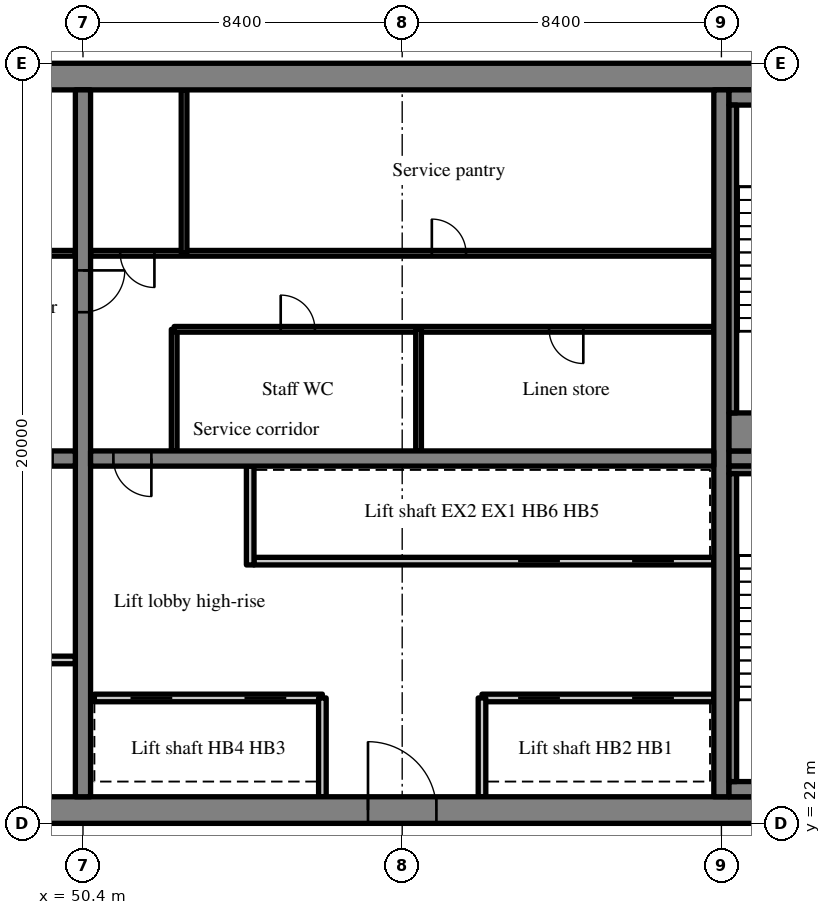
"""IFC4 building model, lengths in metres.
Left out: names, types, materials, properties, quantities, classifications, styles, units other than length and angle.
Written with IfcOpenShell. Run it as: python <this file> out.ifc"""

import sys

from ifc_helpers import new_model, si_unit, direction, frame, frame_2d, origin, place, context, subcontext, project, spatial, rectangle, extrude, source, transform, mapped, element, fill, save


model = new_model("IFC4")
c1 = context("Model", 3, precision=1e-05, world=origin(), true_north=direction((0.0, 1.0)))
c2 = subcontext(c1, "Body", "Model", "MODEL_VIEW")
j1 = project(units=[si_unit("LENGTHUNIT", "METRE"), si_unit("PLANEANGLEUNIT", "RADIAN")], contexts=[c1])
p1 = place(None, origin())
s1 = spatial("IfcSite", under=j1, at=p1, CompositionType="ELEMENT")
p2 = place(p1, origin())
s2 = spatial("IfcBuilding", under=s1, at=p2, CompositionType="ELEMENT")
p3 = place(p2, frame((0.0, 0.0, 197.2)))
s3 = spatial("IfcBuildingStorey", under=s2, at=p3, CompositionType="ELEMENT", Elevation=197.2)
m1 = source(origin(), c2, "Body", "SweptSolid", [
    extrude(rectangle(XDim=50.4, YDim=0.7, at=frame_2d((25.2, 0.0))), origin(), (0.0, 0.0, 1.0), 3.52),
])
p4 = place(p3, frame((25.2, 22.35, 0.0), z_axis=(0.0, 0.0, 1.0), x_axis=(1.0, 0.0, 0.0)))
e1 = element("IfcWall", 1, at=p4, inside=s3, PredefinedType="SHEAR", context=c2, shape_type="MappedRepresentation", body=[
    mapped(m1, transform((0.0, 0.0, 0.0), scale=1.0)),
])
m2 = source(origin(), c2, "Body", "SweptSolid", [
    extrude(rectangle(XDim=1.8, YDim=2.1, at=frame_2d((0.9, 1.05))), frame((0.0, 0.36, 0.0), z_axis=(0.0, -1.0, 0.0), x_axis=(1.0, 0.0, 0.0)), (0.0, 0.0, 1.0), 0.72),
])
p5 = place(p4, frame((15.9, 0.0, 0.0)))
e2 = element("IfcOpeningElement", 2, at=p5, cuts=e1, PredefinedType="OPENING", context=c2, shape_type="MappedRepresentation", body=[
    mapped(m2, transform((0.0, 0.0, 0.0), scale=1.0)),
])
m3 = source(origin(), c2, "Body", "SweptSolid", [
    extrude(rectangle(XDim=0.9, YDim=2.1, at=frame_2d((0.45, 1.05))), frame((0.0, 0.36, 0.0), z_axis=(0.0, -1.0, 0.0), x_axis=(1.0, 0.0, 0.0)), (0.0, 0.0, 1.0), 0.72),
])
p6 = place(p4, frame((21.5, 0.0, 0.0)))
e3 = element("IfcOpeningElement", 3, at=p6, cuts=e1, PredefinedType="OPENING", context=c2, shape_type="MappedRepresentation", body=[
    mapped(m3, transform((0.0, 0.0, 0.0), scale=1.0)),
])
p7 = place(p4, frame((32.7, 0.0, 0.0)))
e4 = element("IfcOpeningElement", 4, at=p7, cuts=e1, PredefinedType="OPENING", context=c2, shape_type="MappedRepresentation", body=[
    mapped(m2, transform((0.0, 0.0, 0.0), scale=1.0)),
])
m4 = source(origin(), c2, "Body", "SweptSolid", [
    extrude(rectangle(XDim=1.2, YDim=2.1, at=frame_2d((0.6, 1.05))), frame((0.0, 0.36, 0.0), z_axis=(0.0, -1.0, 0.0), x_axis=(1.0, 0.0, 0.0)), (0.0, 0.0, 1.0), 0.72),
])
p8 = place(p4, frame((6.475, 0.0, 0.0)))
e5 = element("IfcOpeningElement", 5, at=p8, cuts=e1, PredefinedType="OPENING", context=c2, shape_type="MappedRepresentation", body=[
    mapped(m4, transform((0.0, 0.0, 0.0), scale=1.0)),
])
p9 = place(p4, frame((47.875, 0.0, 0.0)))
e6 = element("IfcOpeningElement", 6, at=p9, cuts=e1, PredefinedType="OPENING", context=c2, shape_type="MappedRepresentation", body=[
    mapped(m4, transform((0.0, 0.0, 0.0), scale=1.0)),
])
p10 = place(p3, frame((25.2, 41.65, 0.0), z_axis=(0.0, 0.0, 1.0), x_axis=(1.0, 0.0, 0.0)))
e7 = element("IfcWall", 7, at=p10, inside=s3, PredefinedType="SHEAR", context=c2, shape_type="MappedRepresentation", body=[
    mapped(m1, transform((0.0, 0.0, 0.0), scale=1.0)),
])
m5 = source(origin(), c2, "Body", "SweptSolid", [
    extrude(rectangle(XDim=18.6, YDim=0.4, at=frame_2d((9.3, 0.0))), origin(), (0.0, 0.0, 1.0), 3.52),
])
p11 = place(p3, frame((50.4, 22.7, 0.0), z_axis=(0.0, 0.0, 1.0), x_axis=(0.0, 1.0, 0.0)))
e8 = element("IfcWall", 8, at=p11, inside=s3, PredefinedType="SHEAR", context=c2, shape_type="MappedRepresentation", body=[
    mapped(m5, transform((0.0, 0.0, 0.0), scale=1.0)),
])
m6 = source(origin(), c2, "Body", "SweptSolid", [
    extrude(rectangle(XDim=1.1, YDim=2.1, at=frame_2d((0.55, 1.05))), frame((0.0, 0.21, 0.0), z_axis=(0.0, -1.0, 0.0), x_axis=(1.0, 0.0, 0.0)), (0.0, 0.0, 1.0), 0.42),
])
p12 = place(p11, frame((12.75, 0.0, 0.0)))
e9 = element("IfcOpeningElement", 9, at=p12, cuts=e8, PredefinedType="OPENING", context=c2, shape_type="MappedRepresentation", body=[
    mapped(m6, transform((0.0, 0.0, 0.0), scale=1.0)),
])
p13 = place(p3, frame((67.2, 22.7, 0.0), z_axis=(0.0, 0.0, 1.0), x_axis=(0.0, 1.0, 0.0)))
e10 = element("IfcWall", 10, at=p13, inside=s3, PredefinedType="SHEAR", context=c2, shape_type="MappedRepresentation", body=[
    mapped(m5, transform((0.0, 0.0, 0.0), scale=1.0)),
])
m7 = source(origin(), c2, "Body", "SweptSolid", [
    extrude(rectangle(XDim=16.4, YDim=0.4, at=frame_2d((8.2, 0.0))), origin(), (0.0, 0.0, 1.0), 3.52),
])
p14 = place(p3, frame((33.8, 31.6, 0.0), z_axis=(0.0, 0.0, 1.0), x_axis=(1.0, 0.0, 0.0)))
e11 = element("IfcWall", 11, at=p14, inside=s3, PredefinedType="SHEAR", context=c2, shape_type="MappedRepresentation", body=[
    mapped(m7, transform((0.0, 0.0, 0.0), scale=1.0)),
])
m8 = source(origin(), c2, "Body", "SweptSolid", [
    extrude(rectangle(XDim=1.0, YDim=2.1, at=frame_2d((0.5, 1.05))), frame((0.0, 0.21, 0.0), z_axis=(0.0, -1.0, 0.0), x_axis=(1.0, 0.0, 0.0)), (0.0, 0.0, 1.0), 0.42),
])
p15 = place(p14, frame((14.8, 0.0, 0.0)))
e12 = element("IfcOpeningElement", 12, at=p15, cuts=e11, PredefinedType="OPENING", context=c2, shape_type="MappedRepresentation", body=[
    mapped(m8, transform((0.0, 0.0, 0.0), scale=1.0)),
])
p16 = place(p3, frame((50.6, 31.6, 0.0), z_axis=(0.0, 0.0, 1.0), x_axis=(1.0, 0.0, 0.0)))
e13 = element("IfcWall", 13, at=p16, inside=s3, PredefinedType="SHEAR", context=c2, shape_type="MappedRepresentation", body=[
    mapped(m7, transform((0.0, 0.0, 0.0), scale=1.0)),
])
p17 = place(p16, frame((0.6, 0.0, 0.0)))
e14 = element("IfcOpeningElement", 14, at=p17, cuts=e13, PredefinedType="OPENING", context=c2, shape_type="MappedRepresentation", body=[
    mapped(m8, transform((0.0, 0.0, 0.0), scale=1.0)),
])
m9 = source(origin(), c2, "Body", "SweptSolid", [
    extrude(rectangle(XDim=7.5, YDim=0.4, at=frame_2d((3.75, 0.0))), origin(), (0.0, 0.0, 1.0), 3.52),
])
p18 = place(p3, frame((67.4, 31.6, 0.0), z_axis=(0.0, 0.0, 1.0), x_axis=(1.0, 0.0, 0.0)))
e15 = element("IfcWall", 15, at=p18, inside=s3, PredefinedType="SHEAR", context=c2, shape_type="MappedRepresentation", body=[
    mapped(m9, transform((0.0, 0.0, 0.0), scale=1.0)),
])
p19 = place(p18, frame((5.725, 0.0, 0.0)))
e16 = element("IfcOpeningElement", 16, at=p19, cuts=e15, PredefinedType="OPENING", context=c2, shape_type="MappedRepresentation", body=[
    mapped(m6, transform((0.0, 0.0, 0.0), scale=1.0)),
])
m10 = source(origin(), c2, "Body", "SweptSolid", [
    extrude(rectangle(XDim=6.1, YDim=0.2, at=frame_2d((3.05, 0.0))), origin(), (0.0, 0.0, 1.0), 3.52),
])
p20 = place(p3, frame((44.1, 26.3, 0.0), z_axis=(0.0, 0.0, 1.0), x_axis=(1.0, 0.0, 0.0)))
e17 = element("IfcWall", 17, at=p20, inside=s3, PredefinedType="PARTITIONING", context=c2, shape_type="MappedRepresentation", body=[
    mapped(m10, transform((0.0, 0.0, 0.0), scale=1.0)),
])
m11 = source(origin(), c2, "Body", "SweptSolid", [
    extrude(rectangle(XDim=16.4, YDim=0.15, at=frame_2d((8.2, 0.0))), origin(), (0.0, 0.0, 1.0), 3.52),
])
p21 = place(p3, frame((33.8, 37.0, 0.0), z_axis=(0.0, 0.0, 1.0), x_axis=(1.0, 0.0, 0.0)))
e18 = element("IfcWall", 18, at=p21, inside=s3, PredefinedType="PARTITIONING", context=c2, shape_type="MappedRepresentation", body=[
    mapped(m11, transform((0.0, 0.0, 0.0), scale=1.0)),
])
m12 = source(origin(), c2, "Body", "SweptSolid", [
    extrude(rectangle(XDim=0.9, YDim=2.1, at=frame_2d((0.45, 1.05))), frame((0.0, 0.085, 0.0), z_axis=(0.0, -1.0, 0.0), x_axis=(1.0, 0.0, 0.0)), (0.0, 0.0, 1.0), 0.17),
])
p22 = place(p21, frame((0.78, 0.0, 0.0)))
e19 = element("IfcOpeningElement", 19, at=p22, cuts=e18, PredefinedType="OPENING", context=c2, shape_type="MappedRepresentation", body=[
    mapped(m12, transform((0.0, 0.0, 0.0), scale=1.0)),
])
p23 = place(p21, frame((3.65, 0.0, 0.0)))
e20 = element("IfcOpeningElement", 20, at=p23, cuts=e18, PredefinedType="OPENING", context=c2, shape_type="MappedRepresentation", body=[
    mapped(m12, transform((0.0, 0.0, 0.0), scale=1.0)),
])
p24 = place(p21, frame((9.39, 0.0, 0.0)))
e21 = element("IfcOpeningElement", 21, at=p24, cuts=e18, PredefinedType="OPENING", context=c2, shape_type="MappedRepresentation", body=[
    mapped(m12, transform((0.0, 0.0, 0.0), scale=1.0)),
])
p25 = place(p21, frame((14.72, 0.0, 0.0)))
e22 = element("IfcOpeningElement", 22, at=p25, cuts=e18, PredefinedType="OPENING", context=c2, shape_type="MappedRepresentation", body=[
    mapped(m12, transform((0.0, 0.0, 0.0), scale=1.0)),
])
m13 = source(origin(), c2, "Body", "SweptSolid", [
    extrude(rectangle(XDim=6.1, YDim=0.2, at=frame_2d((3.05, 0.0))), origin(), (0.0, 0.0, 1.0), 3.52),
])
p26 = place(p3, frame((67.0, 25.3, 0.0), z_axis=(0.0, 0.0, 1.0), x_axis=(-1.0, 0.0, 0.0)))
e23 = element("IfcWall", 23, at=p26, inside=s3, PredefinedType="SOLIDWALL", context=c2, shape_type="MappedRepresentation", body=[
    mapped(m13, transform((0.0, 0.0, 0.0), scale=1.0)),
])
m14 = source(origin(), c2, "Body", "SweptSolid", [
    extrude(rectangle(XDim=1.1, YDim=2.1, at=frame_2d((0.55, 1.05))), frame((0.0, 0.11, 0.0), z_axis=(0.0, -1.0, 0.0), x_axis=(1.0, 0.0, 0.0)), (0.0, 0.0, 1.0), 0.22),
])
p27 = place(p26, frame((1.05, 0.0, 0.0)))
e24 = element("IfcOpeningElement", 24, at=p27, cuts=e23, PredefinedType="OPENING", context=c2, shape_type="MappedRepresentation", body=[
    mapped(m14, transform((0.0, 0.0, 0.0), scale=1.0)),
])
p28 = place(p26, frame((4.05, 0.0, 0.0)))
e25 = element("IfcOpeningElement", 25, at=p28, cuts=e23, PredefinedType="OPENING", context=c2, shape_type="MappedRepresentation", body=[
    mapped(m14, transform((0.0, 0.0, 0.0), scale=1.0)),
])
m15 = source(origin(), c2, "Body", "SweptSolid", [
    extrude(rectangle(XDim=6.0, YDim=0.2, at=frame_2d((3.0, 0.0))), origin(), (0.0, 0.0, 1.0), 3.52),
])
p29 = place(p3, frame((56.7, 25.3, 0.0), z_axis=(0.0, 0.0, 1.0), x_axis=(-1.0, 0.0, 0.0)))
e26 = element("IfcWall", 26, at=p29, inside=s3, PredefinedType="SOLIDWALL", context=c2, shape_type="MappedRepresentation", body=[
    mapped(m15, transform((0.0, 0.0, 0.0), scale=1.0)),
])
p30 = place(p29, frame((0.95, 0.0, 0.0)))
e27 = element("IfcOpeningElement", 27, at=p30, cuts=e26, PredefinedType="OPENING", context=c2, shape_type="MappedRepresentation", body=[
    mapped(m14, transform((0.0, 0.0, 0.0), scale=1.0)),
])
p31 = place(p29, frame((3.95, 0.0, 0.0)))
e28 = element("IfcOpeningElement", 28, at=p31, cuts=e26, PredefinedType="OPENING", context=c2, shape_type="MappedRepresentation", body=[
    mapped(m14, transform((0.0, 0.0, 0.0), scale=1.0)),
])
m16 = source(origin(), c2, "Body", "SweptSolid", [
    extrude(rectangle(XDim=12.1, YDim=0.2, at=frame_2d((6.05, 0.0))), origin(), (0.0, 0.0, 1.0), 3.52),
])
p32 = place(p3, frame((67.0, 28.9, 0.0), z_axis=(0.0, 0.0, 1.0), x_axis=(-1.0, 0.0, 0.0)))
e29 = element("IfcWall", 29, at=p32, inside=s3, PredefinedType="SOLIDWALL", context=c2, shape_type="MappedRepresentation", body=[
    mapped(m16, transform((0.0, 0.0, 0.0), scale=1.0)),
])
p33 = place(p32, frame((1.05, 0.0, 0.0)))
e30 = element("IfcOpeningElement", 30, at=p33, cuts=e29, PredefinedType="OPENING", context=c2, shape_type="MappedRepresentation", body=[
    mapped(m14, transform((0.0, 0.0, 0.0), scale=1.0)),
])
p34 = place(p32, frame((4.05, 0.0, 0.0)))
e31 = element("IfcOpeningElement", 31, at=p34, cuts=e29, PredefinedType="OPENING", context=c2, shape_type="MappedRepresentation", body=[
    mapped(m14, transform((0.0, 0.0, 0.0), scale=1.0)),
])
m17 = source(origin(), c2, "Body", "SweptSolid", [
    extrude(rectangle(XDim=2.6, YDim=0.2, at=frame_2d((1.3, 0.0))), origin(), (0.0, 0.0, 1.0), 3.52),
])
for number, where, z_axis, x_axis in (
    (32, (60.9, 22.7, 0.0), (0.0, 0.0, 1.0), (0.0, 1.0, 0.0)),
    (33, (56.7, 22.7, 0.0), (0.0, 0.0, 1.0), (0.0, 1.0, 0.0)),
):
    element("IfcWall", number, at=place(p3, frame(where, z_axis=z_axis, x_axis=x_axis)), inside=s3, PredefinedType="SOLIDWALL", context=c2, shape_type="MappedRepresentation", body=[
        mapped(m17, transform((0.0, 0.0, 0.0), scale=1.0)),
    ])
m18 = source(origin(), c2, "Body", "SweptSolid", [
    extrude(rectangle(XDim=2.6, YDim=0.2, at=frame_2d((1.3, 0.0))), origin(), (0.0, 0.0, 1.0), 3.52),
])
p35 = place(p3, frame((54.8, 28.8, 0.0), z_axis=(0.0, 0.0, 1.0), x_axis=(0.0, 1.0, 0.0)))
e34 = element("IfcWall", 34, at=p35, inside=s3, PredefinedType="SOLIDWALL", context=c2, shape_type="MappedRepresentation", body=[
    mapped(m18, transform((0.0, 0.0, 0.0), scale=1.0)),
])
m19 = source(origin(), c2, "Body", "SweptSolid", [
    extrude(rectangle(XDim=3.2, YDim=0.15, at=frame_2d((1.6, 0.0))), origin(), (0.0, 0.0, 1.0), 3.52),
])
p36 = place(p3, frame((52.8, 31.8, 0.0), z_axis=(0.0, 0.0, 1.0), x_axis=(0.0, 1.0, 0.0)))
e35 = element("IfcWall", 35, at=p36, inside=s3, PredefinedType="PARTITIONING", context=c2, shape_type="MappedRepresentation", body=[
    mapped(m19, transform((0.0, 0.0, 0.0), scale=1.0)),
])
m20 = source(origin(), c2, "Body", "SweptSolid", [
    extrude(rectangle(XDim=14.2, YDim=0.15, at=frame_2d((7.1, 0.0))), origin(), (0.0, 0.0, 1.0), 3.52),
])
p37 = place(p3, frame((67.0, 35.0, 0.0), z_axis=(0.0, 0.0, 1.0), x_axis=(-1.0, 0.0, 0.0)))
e36 = element("IfcWall", 36, at=p37, inside=s3, PredefinedType="PARTITIONING", context=c2, shape_type="MappedRepresentation", body=[
    mapped(m20, transform((0.0, 0.0, 0.0), scale=1.0)),
])
p38 = place(p37, frame((3.434, 0.0, 0.0)))
e37 = element("IfcOpeningElement", 37, at=p38, cuts=e36, PredefinedType="OPENING", context=c2, shape_type="MappedRepresentation", body=[
    mapped(m12, transform((0.0, 0.0, 0.0), scale=1.0)),
])
p39 = place(p37, frame((10.497, 0.0, 0.0)))
e38 = element("IfcOpeningElement", 38, at=p39, cuts=e36, PredefinedType="OPENING", context=c2, shape_type="MappedRepresentation", body=[
    mapped(m12, transform((0.0, 0.0, 0.0), scale=1.0)),
])
p40 = place(p3, frame((67.0, 37.0, 0.0), z_axis=(0.0, 0.0, 1.0), x_axis=(-1.0, 0.0, 0.0)))
e39 = element("IfcWall", 39, at=p40, inside=s3, PredefinedType="PARTITIONING", context=c2, shape_type="MappedRepresentation", body=[
    mapped(m11, transform((0.0, 0.0, 0.0), scale=1.0)),
])
p41 = place(p40, frame((6.52, 0.0, 0.0)))
e40 = element("IfcOpeningElement", 40, at=p41, cuts=e39, PredefinedType="OPENING", context=c2, shape_type="MappedRepresentation", body=[
    mapped(m12, transform((0.0, 0.0, 0.0), scale=1.0)),
])
p42 = place(p40, frame((14.72, 0.0, 0.0)))
e41 = element("IfcOpeningElement", 41, at=p42, cuts=e39, PredefinedType="OPENING", context=c2, shape_type="MappedRepresentation", body=[
    mapped(m12, transform((0.0, 0.0, 0.0), scale=1.0)),
])
p43 = place(p3, frame((59.231, 31.8, 0.0), z_axis=(0.0, 0.0, 1.0), x_axis=(0.0, 1.0, 0.0)))
e42 = element("IfcWall", 42, at=p43, inside=s3, PredefinedType="PARTITIONING", context=c2, shape_type="MappedRepresentation", body=[
    mapped(m19, transform((0.0, 0.0, 0.0), scale=1.0)),
])
m21 = source(origin(), c2, "Body", "SweptSolid", [
    extrude(rectangle(XDim=4.3, YDim=0.15, at=frame_2d((2.15, 0.0))), origin(), (0.0, 0.0, 1.0), 3.52),
])
p44 = place(p3, frame((53.06, 37.0, 0.0), z_axis=(0.0, 0.0, 1.0), x_axis=(0.0, 1.0, 0.0)))
e43 = element("IfcWall", 43, at=p44, inside=s3, PredefinedType="PARTITIONING", context=c2, shape_type="MappedRepresentation", body=[
    mapped(m21, transform((0.0, 0.0, 0.0), scale=1.0)),
])
m22 = source(origin(), c2, "Body", "SweptSolid", [
    extrude(rectangle(XDim=4.85, YDim=0.4, at=frame_2d((2.425, 0.0))), origin(), (0.0, 0.0, 1.0), 3.52),
])
p45 = place(p3, frame((67.4, 22.9, 0.0), z_axis=(0.0, 0.0, 1.0), x_axis=(1.0, 0.0, 0.0)))
e44 = element("IfcWall", 44, at=p45, inside=s3, PredefinedType="SOLIDWALL", context=c2, shape_type="MappedRepresentation", body=[
    mapped(m22, transform((0.0, 0.0, 0.0), scale=1.0)),
])
m23 = source(origin(), c2, "Body", "SweptSolid", [
    extrude(rectangle(XDim=4.85, YDim=0.2, at=frame_2d((2.425, 0.0))), origin(), (0.0, 0.0, 1.0), 3.52),
])
p46 = place(p3, frame((67.4, 31.3, 0.0), z_axis=(0.0, 0.0, 1.0), x_axis=(1.0, 0.0, 0.0)))
e45 = element("IfcWall", 45, at=p46, inside=s3, PredefinedType="SOLIDWALL", context=c2, shape_type="MappedRepresentation", body=[
    mapped(m23, transform((0.0, 0.0, 0.0), scale=1.0)),
])
m24 = source(origin(), c2, "Body", "SweptSolid", [
    extrude(rectangle(XDim=8.1, YDim=0.2, at=frame_2d((4.05, 0.0))), origin(), (0.0, 0.0, 1.0), 3.52),
])
p47 = place(p3, frame((67.5, 23.1, 0.0), z_axis=(0.0, 0.0, 1.0), x_axis=(0.0, 1.0, 0.0)))
e46 = element("IfcWall", 46, at=p47, inside=s3, PredefinedType="SOLIDWALL", context=c2, shape_type="MappedRepresentation", body=[
    mapped(m24, transform((0.0, 0.0, 0.0), scale=1.0)),
])
p48 = place(p3, frame((67.4, 41.1, 0.0), z_axis=(0.0, 0.0, 1.0), x_axis=(1.0, 0.0, 0.0)))
e47 = element("IfcWall", 47, at=p48, inside=s3, PredefinedType="SOLIDWALL", context=c2, shape_type="MappedRepresentation", body=[
    mapped(m22, transform((0.0, 0.0, 0.0), scale=1.0)),
])
m25 = source(origin(), c2, "Body", "SweptSolid", [
    extrude(rectangle(XDim=4.85, YDim=1.0, at=frame_2d((2.425, 0.0))), origin(), (0.0, 0.0, 1.0), 3.52),
])
p49 = place(p3, frame((67.4, 32.3, 0.0), z_axis=(0.0, 0.0, 1.0), x_axis=(1.0, 0.0, 0.0)))
e48 = element("IfcWall", 48, at=p49, inside=s3, PredefinedType="SOLIDWALL", context=c2, shape_type="MappedRepresentation", body=[
    mapped(m25, transform((0.0, 0.0, 0.0), scale=1.0)),
])
p50 = place(p3, frame((67.5, 32.8, 0.0), z_axis=(0.0, 0.0, 1.0), x_axis=(0.0, 1.0, 0.0)))
e49 = element("IfcWall", 49, at=p50, inside=s3, PredefinedType="SOLIDWALL", context=c2, shape_type="MappedRepresentation", body=[
    mapped(m24, transform((0.0, 0.0, 0.0), scale=1.0)),
])
m26 = source(origin(), c2, "Body", "SweptSolid", [
    extrude(rectangle(XDim=1.8, YDim=2.1, at=frame_2d((0.9, 1.05))), frame((0.0, 0.275, 0.0), z_axis=(0.0, -1.0, 0.0), x_axis=(1.0, 0.0, 0.0)), (0.0, 0.0, 1.0), 0.05),
])
p51 = place(p7, origin())
e50 = element("IfcDoor", 50, at=p51, inside=s3, OperationType="DOUBLE_DOOR_SINGLE_SWING", PredefinedType="DOOR", context=c2, shape_type="MappedRepresentation", body=[
    mapped(m26, transform((0.0, 0.0, 0.0), scale=1.0)),
])
fill(e4, e50)
m27 = source(origin(), c2, "Body", "SweptSolid", [
    extrude(rectangle(XDim=1.0, YDim=2.1, at=frame_2d((0.5, 1.05))), frame((0.0, 0.025, 0.0), z_axis=(0.0, -1.0, 0.0), x_axis=(1.0, 0.0, 0.0)), (0.0, 0.0, 1.0), 0.05),
])
p52 = place(p17, origin())
e51 = element("IfcDoor", 51, at=p52, inside=s3, OperationType="SINGLE_SWING_RIGHT", PredefinedType="DOOR", context=c2, shape_type="MappedRepresentation", body=[
    mapped(m27, transform((0.0, 0.0, 0.0), scale=1.0)),
])
fill(e14, e51)
m28 = source(origin(), c2, "Body", "SweptSolid", [
    extrude(rectangle(XDim=1.1, YDim=2.1, at=frame_2d((0.55, 1.05))), frame((0.0, 0.025, 0.0), z_axis=(0.0, -1.0, 0.0), x_axis=(1.0, 0.0, 0.0)), (0.0, 0.0, 1.0), 0.05),
])
p53 = place(p27, origin())
e52 = element("IfcDoor", 52, at=p53, inside=s3, OperationType="SLIDING_TO_RIGHT", PredefinedType="DOOR", context=c2, shape_type="MappedRepresentation", body=[
    mapped(m28, transform((0.0, 0.0, 0.0), scale=1.0)),
])
fill(e24, e52)
p54 = place(p28, origin())
e53 = element("IfcDoor", 53, at=p54, inside=s3, OperationType="SLIDING_TO_LEFT", PredefinedType="DOOR", context=c2, shape_type="MappedRepresentation", body=[
    mapped(m28, transform((0.0, 0.0, 0.0), scale=1.0)),
])
fill(e25, e53)
p55 = place(p30, origin())
e54 = element("IfcDoor", 54, at=p55, inside=s3, OperationType="SLIDING_TO_RIGHT", PredefinedType="DOOR", context=c2, shape_type="MappedRepresentation", body=[
    mapped(m28, transform((0.0, 0.0, 0.0), scale=1.0)),
])
fill(e27, e54)
p56 = place(p31, origin())
e55 = element("IfcDoor", 55, at=p56, inside=s3, OperationType="SLIDING_TO_LEFT", PredefinedType="DOOR", context=c2, shape_type="MappedRepresentation", body=[
    mapped(m28, transform((0.0, 0.0, 0.0), scale=1.0)),
])
fill(e28, e55)
p57 = place(p33, origin())
e56 = element("IfcDoor", 56, at=p57, inside=s3, OperationType="SLIDING_TO_RIGHT", PredefinedType="DOOR", context=c2, shape_type="MappedRepresentation", body=[
    mapped(m28, transform((0.0, 0.0, 0.0), scale=1.0)),
])
fill(e30, e56)
p58 = place(p34, origin())
e57 = element("IfcDoor", 57, at=p58, inside=s3, OperationType="SLIDING_TO_LEFT", PredefinedType="DOOR", context=c2, shape_type="MappedRepresentation", body=[
    mapped(m28, transform((0.0, 0.0, 0.0), scale=1.0)),
])
fill(e31, e57)
m29 = source(origin(), c2, "Body", "SweptSolid", [
    extrude(rectangle(XDim=0.9, YDim=2.1, at=frame_2d((0.45, 1.05))), frame((0.0, 0.025, 0.0), z_axis=(0.0, -1.0, 0.0), x_axis=(1.0, 0.0, 0.0)), (0.0, 0.0, 1.0), 0.05),
])
p59 = place(p38, origin())
e58 = element("IfcDoor", 58, at=p59, inside=s3, OperationType="SINGLE_SWING_LEFT", PredefinedType="DOOR", context=c2, shape_type="MappedRepresentation", body=[
    mapped(m29, transform((0.0, 0.0, 0.0), scale=1.0)),
])
fill(e37, e58)
p60 = place(p39, origin())
e59 = element("IfcDoor", 59, at=p60, inside=s3, OperationType="SINGLE_SWING_RIGHT", PredefinedType="DOOR", context=c2, shape_type="MappedRepresentation", body=[
    mapped(m29, transform((0.0, 0.0, 0.0), scale=1.0)),
])
fill(e38, e59)
p61 = place(p41, origin())
e60 = element("IfcDoor", 60, at=p61, inside=s3, OperationType="SINGLE_SWING_RIGHT", PredefinedType="DOOR", context=c2, shape_type="MappedRepresentation", body=[
    mapped(m29, transform((0.0, 0.0, 0.0), scale=1.0)),
])
fill(e40, e60)
p62 = place(p42, origin())
e61 = element("IfcDoor", 61, at=p62, inside=s3, OperationType="SINGLE_SWING_LEFT", PredefinedType="DOOR", context=c2, shape_type="MappedRepresentation", body=[
    mapped(m29, transform((0.0, 0.0, 0.0), scale=1.0)),
])
fill(e41, e61)
p63 = place(p12, origin())
e62 = element("IfcDoor", 62, at=p63, inside=s3, OperationType="SINGLE_SWING_RIGHT", PredefinedType="DOOR", context=c2, shape_type="MappedRepresentation", body=[
    mapped(m28, transform((0.0, 0.0, 0.0), scale=1.0)),
])
fill(e9, e62)
save(model, sys.argv[1])
